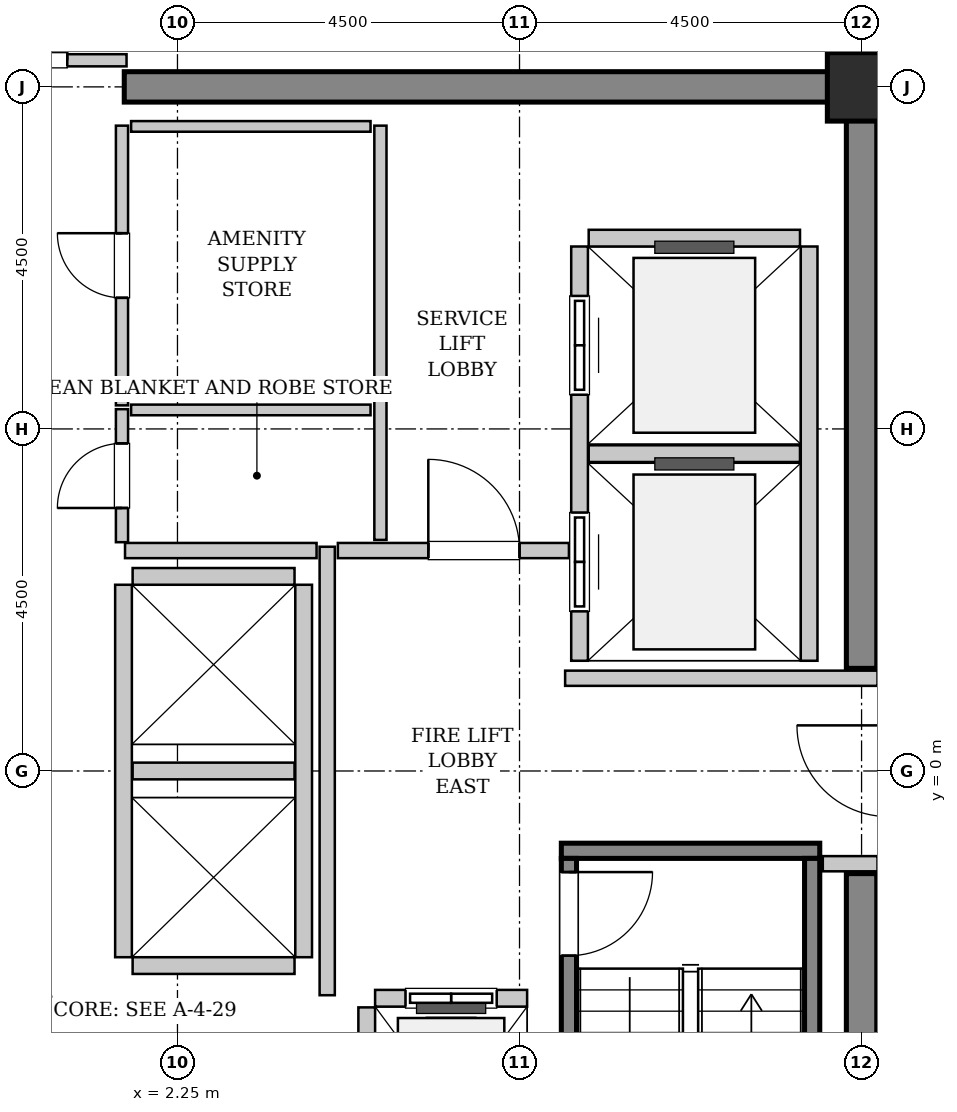
"""IFC4 building model, lengths in metres.
Left out: names, types, materials, properties, quantities, classifications, styles, units other than length and angle.
Written with IfcOpenShell. Run it as: python <this file> out.ifc"""

import sys

from ifc_helpers import new_model, si_unit, direction, frame, frame_2d, origin, origin_2d, place, context, subcontext, project, spatial, rectangle, extrude, source, transform, mapped, element, fill, save


model = new_model("IFC4")
c1 = context("Model", 3, precision=1e-05, world=origin(), true_north=direction((0.0, 1.0)))
c2 = subcontext(c1, "Body", "Model", "MODEL_VIEW")
j1 = project(units=[si_unit("LENGTHUNIT", "METRE"), si_unit("PLANEANGLEUNIT", "RADIAN")], contexts=[c1])
p1 = place(None, origin())
s1 = spatial("IfcSite", under=j1, at=p1, CompositionType="ELEMENT")
p2 = place(p1, origin())
s2 = spatial("IfcBuilding", under=s1, at=p2, CompositionType="ELEMENT")
p3 = place(p2, frame((0.0, 0.0, 333.8)))
s3 = spatial("IfcBuildingStorey", under=s2, at=p3, CompositionType="ELEMENT", Elevation=333.8)
m1 = source(origin(), c2, "Body", "SweptSolid", [
    extrude(rectangle(XDim=9.9, YDim=0.4, at=frame_2d((4.95, 0.0))), origin(), (0.0, 0.0, 1.0), 3.8),
])
p4 = place(p3, frame((1.55, 9.0, 0.0), z_axis=(0.0, 0.0, 1.0), x_axis=(1.0, 0.0, 0.0)))
e1 = element("IfcWall", 1, at=p4, inside=s3, PredefinedType="SHEAR", context=c2, shape_type="MappedRepresentation", body=[
    mapped(m1, transform((0.0, 0.0, 0.0), x_axis=(1.0, 0.0, 0.0), y_axis=(0.0, 1.0, 0.0), z_axis=(0.0, 0.0, 1.0), scale=1.0)),
])
m2 = source(origin(), c2, "Body", "SweptSolid", [
    extrude(rectangle(XDim=7.45, YDim=0.4, at=frame_2d((3.725, 0.0))), origin(), (0.0, 0.0, 1.0), 3.8),
])
for number, where, z_axis, x_axis in (
    (2, (11.25, -8.8, 0.0), (0.0, 0.0, 1.0), (0.0, 1.0, 0.0)),
    (3, (11.25, 1.35, 0.0), (0.0, 0.0, 1.0), (0.0, 1.0, 0.0)),
):
    element("IfcWall", number, at=place(p3, frame(where, z_axis=z_axis, x_axis=x_axis)), inside=s3, PredefinedType="SHEAR", context=c2, shape_type="MappedRepresentation", body=[
        mapped(m2, transform((0.0, 0.0, 0.0), x_axis=(1.0, 0.0, 0.0), y_axis=(0.0, 1.0, 0.0), z_axis=(0.0, 0.0, 1.0), scale=1.0)),
    ])
m3 = source(origin(), c2, "Body", "SweptSolid", [
    extrude(rectangle(XDim=0.9, YDim=0.9, at=origin_2d()), origin(), (0.0, 0.0, 1.0), 3.8),
])
p5 = place(p3, frame((11.25, 9.0, 0.0), z_axis=(0.0, 0.0, 1.0), x_axis=(1.0, 0.0, 0.0)))
e4 = element("IfcColumn", 4, at=p5, inside=s3, PredefinedType="COLUMN", context=c2, shape_type="MappedRepresentation", body=[
    mapped(m3, transform((0.0, 0.0, 0.0), x_axis=(1.0, 0.0, 0.0), y_axis=(0.0, 1.0, 0.0), z_axis=(0.0, 0.0, 1.0), scale=1.0)),
])
m4 = source(origin(), c2, "Body", "SweptSolid", [
    extrude(rectangle(XDim=3.4, YDim=0.2, at=frame_2d((1.7, 0.0))), origin(), (0.0, 0.0, 1.0), 3.8),
])
p6 = place(p3, frame((7.3, -1.05, 0.0), z_axis=(0.0, 0.0, 1.0), x_axis=(1.0, 0.0, 0.0)))
e5 = element("IfcWall", 5, at=p6, inside=s3, PredefinedType="SOLIDWALL", context=c2, shape_type="MappedRepresentation", body=[
    mapped(m4, transform((0.0, 0.0, 0.0), x_axis=(1.0, 0.0, 0.0), y_axis=(0.0, 1.0, 0.0), z_axis=(0.0, 0.0, 1.0), scale=1.0)),
])
m5 = source(origin(), c2, "Body", "SweptSolid", [
    extrude(rectangle(XDim=7.1, YDim=0.2, at=frame_2d((3.55, 0.0))), origin(), (0.0, 0.0, 1.0), 3.8),
])
p7 = place(p3, frame((7.4, -1.15, 0.0), z_axis=(0.0, 0.0, 1.0), x_axis=(0.0, -1.0, 0.0)))
e6 = element("IfcWall", 6, at=p7, inside=s3, PredefinedType="SOLIDWALL", context=c2, shape_type="MappedRepresentation", body=[
    mapped(m5, transform((0.0, 0.0, 0.0), x_axis=(1.0, 0.0, 0.0), y_axis=(0.0, 1.0, 0.0), z_axis=(0.0, 0.0, 1.0), scale=1.0)),
])
p8 = place(p7, frame((0.18, 0.0, 0.0)))
e7 = element("IfcOpeningElement", 7, at=p8, cuts=e6, PredefinedType="OPENING", context=c2, shape_type="SweptSolid", body=[
    extrude(rectangle(XDim=1.1, YDim=2.15, at=frame_2d((0.55, 1.075))), frame((0.0, 0.11, 0.0), z_axis=(0.0, -1.0, 0.0), x_axis=(1.0, 0.0, 0.0)), (0.0, 0.0, 1.0), 0.22),
])
p9 = place(p3, frame((10.6, -1.15, 0.0), z_axis=(0.0, 0.0, 1.0), x_axis=(0.0, -1.0, 0.0)))
e8 = element("IfcWall", 8, at=p9, inside=s3, PredefinedType="SOLIDWALL", context=c2, shape_type="MappedRepresentation", body=[
    mapped(m5, transform((0.0, 0.0, 0.0), x_axis=(1.0, 0.0, 0.0), y_axis=(0.0, 1.0, 0.0), z_axis=(0.0, 0.0, 1.0), scale=1.0)),
])
m6 = source(origin(), c2, "Body", "SweptSolid", [
    extrude(rectangle(XDim=2.0, YDim=0.22, at=frame_2d((1.0, 0.0))), origin(), (0.0, 0.0, 1.0), 3.535),
])
p10 = place(p3, frame((6.85, -2.99, 0.0), z_axis=(0.0, 0.0, 1.0), x_axis=(-1.0, 0.0, 0.0)))
e9 = element("IfcWall", 9, at=p10, inside=s3, PredefinedType="SOLIDWALL", context=c2, shape_type="MappedRepresentation", body=[
    mapped(m6, transform((0.0, 0.0, 0.0), x_axis=(1.0, 0.0, 0.0), y_axis=(0.0, 1.0, 0.0), z_axis=(0.0, 0.0, 1.0), scale=1.0)),
])
p11 = place(p10, frame((0.4, 0.0, 0.0)))
e10 = element("IfcOpeningElement", 10, at=p11, cuts=e9, PredefinedType="OPENING", context=c2, shape_type="SweptSolid", body=[
    extrude(rectangle(XDim=1.2, YDim=2.2, at=frame_2d((0.6, 1.1))), frame((0.0, 0.12, 0.0), z_axis=(0.0, -1.0, 0.0), x_axis=(1.0, 0.0, 0.0)), (0.0, 0.0, 1.0), 0.24),
])
m7 = source(origin(), c2, "Body", "SweptSolid", [
    extrude(rectangle(XDim=2.68, YDim=0.22, at=frame_2d((1.34, 0.0))), origin(), (0.0, 0.0, 1.0), 3.535),
])
p12 = place(p3, frame((4.74, -3.11, 0.0), z_axis=(0.0, 0.0, 1.0), x_axis=(0.0, -1.0, 0.0)))
e11 = element("IfcWall", 11, at=p12, inside=s3, PredefinedType="SOLIDWALL", context=c2, shape_type="MappedRepresentation", body=[
    mapped(m7, transform((0.0, 0.0, 0.0), x_axis=(1.0, 0.0, 0.0), y_axis=(0.0, 1.0, 0.0), z_axis=(0.0, 0.0, 1.0), scale=1.0)),
])
m8 = source(origin(), c2, "Body", "SweptSolid", [
    extrude(rectangle(XDim=5.45, YDim=0.22, at=frame_2d((2.725, 0.0))), origin(), (0.0, 0.0, 1.0), 3.535),
])
p13 = place(p3, frame((7.54, 6.9, 0.0), z_axis=(0.0, 0.0, 1.0), x_axis=(0.0, -1.0, 0.0)))
e12 = element("IfcWall", 12, at=p13, inside=s3, PredefinedType="SOLIDWALL", context=c2, shape_type="MappedRepresentation", body=[
    mapped(m8, transform((0.0, 0.0, 0.0), x_axis=(1.0, 0.0, 0.0), y_axis=(0.0, 1.0, 0.0), z_axis=(0.0, 0.0, 1.0), scale=1.0)),
])
p14 = place(p13, frame((3.5, 0.0, 0.0)))
e13 = element("IfcOpeningElement", 13, at=p14, cuts=e12, PredefinedType="OPENING", context=c2, shape_type="SweptSolid", body=[
    extrude(rectangle(XDim=1.3, YDim=2.3, at=frame_2d((0.65, 1.15))), frame((0.0, 0.12, 0.0), z_axis=(0.0, -1.0, 0.0), x_axis=(1.0, 0.0, 0.0)), (0.0, 0.0, 1.0), 0.24),
])
p15 = place(p13, frame((0.65, 0.0, 0.0)))
e14 = element("IfcOpeningElement", 14, at=p15, cuts=e12, PredefinedType="OPENING", context=c2, shape_type="SweptSolid", body=[
    extrude(rectangle(XDim=1.3, YDim=2.3, at=frame_2d((0.65, 1.15))), frame((0.0, 0.12, 0.0), z_axis=(0.0, -1.0, 0.0), x_axis=(1.0, 0.0, 0.0)), (0.0, 0.0, 1.0), 0.24),
])
p16 = place(p3, frame((10.56, 1.45, 0.0), z_axis=(0.0, 0.0, 1.0), x_axis=(0.0, 1.0, 0.0)))
e15 = element("IfcWall", 15, at=p16, inside=s3, PredefinedType="SOLIDWALL", context=c2, shape_type="MappedRepresentation", body=[
    mapped(m8, transform((0.0, 0.0, 0.0), x_axis=(1.0, 0.0, 0.0), y_axis=(0.0, 1.0, 0.0), z_axis=(0.0, 0.0, 1.0), scale=1.0)),
])
m9 = source(origin(), c2, "Body", "SweptSolid", [
    extrude(rectangle(XDim=2.78, YDim=0.22, at=frame_2d((1.39, 0.0))), origin(), (0.0, 0.0, 1.0), 3.535),
])
for number, where, z_axis, x_axis in (
    (16, (7.66, 4.175, 0.0), (0.0, 0.0, 1.0), (1.0, 0.0, 0.0)),
    (17, (10.44, 7.01, 0.0), (0.0, 0.0, 1.0), (-1.0, 0.0, 0.0)),
):
    element("IfcWall", number, at=place(p3, frame(where, z_axis=z_axis, x_axis=x_axis)), inside=s3, PredefinedType="SOLIDWALL", context=c2, shape_type="MappedRepresentation", body=[
        mapped(m9, transform((0.0, 0.0, 0.0), x_axis=(1.0, 0.0, 0.0), y_axis=(0.0, 1.0, 0.0), z_axis=(0.0, 0.0, 1.0), scale=1.0)),
    ])
m10 = source(origin(), c2, "Body", "SweptSolid", [
    extrude(rectangle(XDim=4.9, YDim=0.22, at=frame_2d((2.45, 0.0))), origin(), (0.0, 0.0, 1.0), 3.535),
])
for number, where, z_axis, x_axis in (
    (18, (1.54, 2.45, 0.0), (0.0, 0.0, 1.0), (0.0, -1.0, 0.0)),
    (19, (3.91, -2.45, 0.0), (0.0, 0.0, 1.0), (0.0, 1.0, 0.0)),
):
    element("IfcWall", number, at=place(p3, frame(where, z_axis=z_axis, x_axis=x_axis)), inside=s3, PredefinedType="SOLIDWALL", context=c2, shape_type="MappedRepresentation", body=[
        mapped(m10, transform((0.0, 0.0, 0.0), x_axis=(1.0, 0.0, 0.0), y_axis=(0.0, 1.0, 0.0), z_axis=(0.0, 0.0, 1.0), scale=1.0)),
    ])
m11 = source(origin(), c2, "Body", "SweptSolid", [
    extrude(rectangle(XDim=2.13, YDim=0.22, at=frame_2d((1.065, 0.0))), origin(), (0.0, 0.0, 1.0), 3.535),
])
for number, where, z_axis, x_axis in (
    (20, (1.66, -2.56, 0.0), (0.0, 0.0, 1.0), (1.0, 0.0, 0.0)),
    (21, (1.66, 0.0, 0.0), (0.0, 0.0, 1.0), (1.0, 0.0, 0.0)),
    (22, (3.79, 2.56, 0.0), (0.0, 0.0, 1.0), (-1.0, 0.0, 0.0)),
):
    element("IfcWall", number, at=place(p3, frame(where, z_axis=z_axis, x_axis=x_axis)), inside=s3, PredefinedType="SOLIDWALL", context=c2, shape_type="MappedRepresentation", body=[
        mapped(m11, transform((0.0, 0.0, 0.0), x_axis=(1.0, 0.0, 0.0), y_axis=(0.0, 1.0, 0.0), z_axis=(0.0, 0.0, 1.0), scale=1.0)),
    ])
m12 = source(origin(), c2, "Body", "SweptSolid", [
    extrude(rectangle(XDim=5.9, YDim=0.2, at=frame_2d((2.95, 0.0))), origin(), (0.0, 0.0, 1.0), 3.535),
])
p17 = place(p3, frame((4.22, -2.95, 0.0), z_axis=(0.0, 0.0, 1.0), x_axis=(0.0, 1.0, 0.0)))
e23 = element("IfcWall", 23, at=p17, inside=s3, PredefinedType="PARTITIONING", context=c2, shape_type="MappedRepresentation", body=[
    mapped(m12, transform((0.0, 0.0, 0.0), x_axis=(1.0, 0.0, 0.0), y_axis=(0.0, 1.0, 0.0), z_axis=(0.0, 0.0, 1.0), scale=1.0)),
])
m13 = source(origin(), c2, "Body", "SweptSolid", [
    extrude(rectangle(XDim=2.52, YDim=0.2, at=frame_2d((1.26, 0.0))), origin(), (0.0, 0.0, 1.0), 3.535),
])
p18 = place(p3, frame((1.56, 2.9, 0.0), z_axis=(0.0, 0.0, 1.0), x_axis=(1.0, 0.0, 0.0)))
e24 = element("IfcWall", 24, at=p18, inside=s3, PredefinedType="PARTITIONING", context=c2, shape_type="MappedRepresentation", body=[
    mapped(m13, transform((0.0, 0.0, 0.0), x_axis=(1.0, 0.0, 0.0), y_axis=(0.0, 1.0, 0.0), z_axis=(0.0, 0.0, 1.0), scale=1.0)),
])
m14 = source(origin(), c2, "Body", "SweptSolid", [
    extrude(rectangle(XDim=3.04, YDim=0.2, at=frame_2d((1.52, 0.0))), origin(), (0.0, 0.0, 1.0), 3.535),
])
p19 = place(p3, frame((4.36, 2.9, 0.0), z_axis=(0.0, 0.0, 1.0), x_axis=(1.0, 0.0, 0.0)))
e25 = element("IfcWall", 25, at=p19, inside=s3, PredefinedType="PARTITIONING", context=c2, shape_type="MappedRepresentation", body=[
    mapped(m14, transform((0.0, 0.0, 0.0), x_axis=(1.0, 0.0, 0.0), y_axis=(0.0, 1.0, 0.0), z_axis=(0.0, 0.0, 1.0), scale=1.0)),
])
p20 = place(p19, frame((1.19, 0.0, 0.0)))
e26 = element("IfcOpeningElement", 26, at=p20, cuts=e25, PredefinedType="OPENING", context=c2, shape_type="SweptSolid", body=[
    extrude(rectangle(XDim=1.2, YDim=2.15, at=frame_2d((0.6, 1.075))), frame((0.0, 0.11, 0.0), z_axis=(0.0, -1.0, 0.0), x_axis=(1.0, 0.0, 0.0)), (0.0, 0.0, 1.0), 0.22),
])
m15 = source(origin(), c2, "Body", "SweptSolid", [
    extrude(rectangle(XDim=4.11, YDim=0.2, at=frame_2d((2.055, 0.0))), origin(), (0.0, 0.0, 1.0), 3.535),
])
p21 = place(p3, frame((7.35, 1.22, 0.0), z_axis=(0.0, 0.0, 1.0), x_axis=(1.0, 0.0, 0.0)))
e27 = element("IfcWall", 27, at=p21, inside=s3, PredefinedType="PARTITIONING", context=c2, shape_type="MappedRepresentation", body=[
    mapped(m15, transform((0.0, 0.0, 0.0), x_axis=(1.0, 0.0, 0.0), y_axis=(0.0, 1.0, 0.0), z_axis=(0.0, 0.0, 1.0), scale=1.0)),
])
m16 = source(origin(), c2, "Body", "SweptSolid", [
    extrude(rectangle(XDim=0.72, YDim=0.2, at=frame_2d((0.36, 0.0))), origin(), (0.0, 0.0, 1.0), 3.535),
])
p22 = place(p3, frame((10.74, -1.22, 0.0), z_axis=(0.0, 0.0, 1.0), x_axis=(1.0, 0.0, 0.0)))
e28 = element("IfcWall", 28, at=p22, inside=s3, PredefinedType="PARTITIONING", context=c2, shape_type="MappedRepresentation", body=[
    mapped(m16, transform((0.0, 0.0, 0.0), x_axis=(1.0, 0.0, 0.0), y_axis=(0.0, 1.0, 0.0), z_axis=(0.0, 0.0, 1.0), scale=1.0)),
])
m17 = source(origin(), c2, "Body", "SweptSolid", [
    extrude(rectangle(XDim=3.16, YDim=0.16, at=frame_2d((1.58, 0.0))), origin(), (0.0, 0.0, 1.0), 2.625),
])
p23 = place(p3, frame((-1.58, 9.35, 0.0), z_axis=(0.0, 0.0, 1.0), x_axis=(1.0, 0.0, 0.0)))
e29 = element("IfcWall", 29, at=p23, inside=s3, PredefinedType="PARTITIONING", context=c2, shape_type="MappedRepresentation", body=[
    mapped(m17, transform((0.0, 0.0, 0.0), x_axis=(1.0, 0.0, 0.0), y_axis=(0.0, 1.0, 0.0), z_axis=(0.0, 0.0, 1.0), scale=1.0)),
])
p24 = place(p23, frame((0.78, 0.0, 0.0)))
e30 = element("IfcOpeningElement", 30, at=p24, cuts=e29, PredefinedType="OPENING", context=c2, shape_type="SweptSolid", body=[
    extrude(rectangle(XDim=1.6, YDim=2.3, at=frame_2d((0.8, 1.15))), frame((0.0, 0.09, 0.0), z_axis=(0.0, -1.0, 0.0), x_axis=(1.0, 0.0, 0.0)), (0.0, 0.0, 1.0), 0.18),
])
m18 = source(origin(), c2, "Body", "SweptSolid", [
    extrude(rectangle(XDim=5.45, YDim=0.16, at=frame_2d((2.725, 0.0))), origin(), (0.0, 0.0, 1.0), 3.535),
])
p25 = place(p3, frame((4.92, 3.04, 0.0), z_axis=(0.0, 0.0, 1.0), x_axis=(0.0, 1.0, 0.0)))
e31 = element("IfcWall", 31, at=p25, inside=s3, PredefinedType="PARTITIONING", context=c2, shape_type="MappedRepresentation", body=[
    mapped(m18, transform((0.0, 0.0, 0.0), x_axis=(1.0, 0.0, 0.0), y_axis=(0.0, 1.0, 0.0), z_axis=(0.0, 0.0, 1.0), scale=1.0)),
])
m19 = source(origin(), c2, "Body", "SweptSolid", [
    extrude(rectangle(XDim=1.75, YDim=0.16, at=frame_2d((0.875, 0.0))), origin(), (0.0, 0.0, 1.0), 3.535),
])
p26 = place(p3, frame((1.52, 3.01, 0.0), z_axis=(0.0, 0.0, 1.0), x_axis=(0.0, 1.0, 0.0)))
e32 = element("IfcWall", 32, at=p26, inside=s3, PredefinedType="PARTITIONING", context=c2, shape_type="MappedRepresentation", body=[
    mapped(m19, transform((0.0, 0.0, 0.0), x_axis=(1.0, 0.0, 0.0), y_axis=(0.0, 1.0, 0.0), z_axis=(0.0, 0.0, 1.0), scale=1.0)),
])
p27 = place(p26, frame((0.45, 0.0, 0.0)))
e33 = element("IfcOpeningElement", 33, at=p27, cuts=e32, PredefinedType="OPENING", context=c2, shape_type="SweptSolid", body=[
    extrude(rectangle(XDim=0.85, YDim=2.1, at=frame_2d((0.425, 1.05))), frame((0.0, 0.09, 0.0), z_axis=(0.0, -1.0, 0.0), x_axis=(1.0, 0.0, 0.0)), (0.0, 0.0, 1.0), 0.18),
])
m20 = source(origin(), c2, "Body", "SweptSolid", [
    extrude(rectangle(XDim=3.15, YDim=0.14, at=frame_2d((1.575, 0.0))), origin(), (0.0, 0.0, 1.0), 3.535),
])
p28 = place(p3, frame((1.64, 4.75, 0.0), z_axis=(0.0, 0.0, 1.0), x_axis=(1.0, 0.0, 0.0)))
e34 = element("IfcWall", 34, at=p28, inside=s3, PredefinedType="PARTITIONING", context=c2, shape_type="MappedRepresentation", body=[
    mapped(m20, transform((0.0, 0.0, 0.0), x_axis=(1.0, 0.0, 0.0), y_axis=(0.0, 1.0, 0.0), z_axis=(0.0, 0.0, 1.0), scale=1.0)),
])
m21 = source(origin(), c2, "Body", "SweptSolid", [
    extrude(rectangle(XDim=3.68, YDim=0.16, at=frame_2d((1.84, 0.0))), origin(), (0.0, 0.0, 1.0), 3.535),
])
p29 = place(p3, frame((1.52, 4.81, 0.0), z_axis=(0.0, 0.0, 1.0), x_axis=(0.0, 1.0, 0.0)))
e35 = element("IfcWall", 35, at=p29, inside=s3, PredefinedType="PARTITIONING", context=c2, shape_type="MappedRepresentation", body=[
    mapped(m21, transform((0.0, 0.0, 0.0), x_axis=(1.0, 0.0, 0.0), y_axis=(0.0, 1.0, 0.0), z_axis=(0.0, 0.0, 1.0), scale=1.0)),
])
p30 = place(p29, frame((1.415, 0.0, 0.0)))
e36 = element("IfcOpeningElement", 36, at=p30, cuts=e35, PredefinedType="OPENING", context=c2, shape_type="SweptSolid", body=[
    extrude(rectangle(XDim=0.85, YDim=2.1, at=frame_2d((0.425, 1.05))), frame((0.0, 0.09, 0.0), z_axis=(0.0, -1.0, 0.0), x_axis=(1.0, 0.0, 0.0)), (0.0, 0.0, 1.0), 0.18),
])
p31 = place(p3, frame((1.64, 8.48, 0.0), z_axis=(0.0, 0.0, 1.0), x_axis=(1.0, 0.0, 0.0)))
e37 = element("IfcWall", 37, at=p31, inside=s3, PredefinedType="PARTITIONING", context=c2, shape_type="MappedRepresentation", body=[
    mapped(m20, transform((0.0, 0.0, 0.0), x_axis=(1.0, 0.0, 0.0), y_axis=(0.0, 1.0, 0.0), z_axis=(0.0, 0.0, 1.0), scale=1.0)),
])
m22 = source(origin(), c2, "Body", "SweptSolid", [
    extrude(rectangle(XDim=1.1, YDim=2.15, at=frame_2d((0.55, 1.075))), frame((0.0, 0.025, 0.0), z_axis=(0.0, -1.0, 0.0), x_axis=(1.0, 0.0, 0.0)), (0.0, 0.0, 1.0), 0.05),
])
p32 = place(p8, origin())
e38 = element("IfcDoor", 38, at=p32, inside=s3, OperationType="SINGLE_SWING_LEFT", PredefinedType="DOOR", context=c2, shape_type="MappedRepresentation", body=[
    mapped(m22, transform((0.0, 0.0, 0.0), x_axis=(1.0, 0.0, 0.0), y_axis=(0.0, 1.0, 0.0), z_axis=(0.0, 0.0, 1.0), scale=1.0)),
])
fill(e7, e38)
m23 = source(origin(), c2, "Body", "SweptSolid", [
    extrude(rectangle(XDim=1.2, YDim=2.2, at=frame_2d((0.6, 1.1))), frame((0.0, 0.025, 0.0), z_axis=(0.0, -1.0, 0.0), x_axis=(1.0, 0.0, 0.0)), (0.0, 0.0, 1.0), 0.05),
])
p33 = place(p11, origin())
e39 = element("IfcDoor", 39, at=p33, inside=s3, OperationType="SLIDING_TO_LEFT", PredefinedType="DOOR", context=c2, shape_type="MappedRepresentation", body=[
    mapped(m23, transform((0.0, 0.0, 0.0), x_axis=(1.0, 0.0, 0.0), y_axis=(0.0, 1.0, 0.0), z_axis=(0.0, 0.0, 1.0), scale=1.0)),
])
fill(e10, e39)
m24 = source(origin(), c2, "Body", "SweptSolid", [
    extrude(rectangle(XDim=1.3, YDim=2.3, at=frame_2d((0.65, 1.15))), frame((0.0, 0.025, 0.0), z_axis=(0.0, -1.0, 0.0), x_axis=(1.0, 0.0, 0.0)), (0.0, 0.0, 1.0), 0.05),
])
p34 = place(p14, origin())
e40 = element("IfcDoor", 40, at=p34, inside=s3, OperationType="SLIDING_TO_RIGHT", PredefinedType="DOOR", context=c2, shape_type="MappedRepresentation", body=[
    mapped(m24, transform((0.0, 0.0, 0.0), x_axis=(1.0, 0.0, 0.0), y_axis=(0.0, 1.0, 0.0), z_axis=(0.0, 0.0, 1.0), scale=1.0)),
])
fill(e13, e40)
p35 = place(p15, origin())
e41 = element("IfcDoor", 41, at=p35, inside=s3, OperationType="SLIDING_TO_RIGHT", PredefinedType="DOOR", context=c2, shape_type="MappedRepresentation", body=[
    mapped(m24, transform((0.0, 0.0, 0.0), x_axis=(1.0, 0.0, 0.0), y_axis=(0.0, 1.0, 0.0), z_axis=(0.0, 0.0, 1.0), scale=1.0)),
])
fill(e14, e41)
m25 = source(origin(), c2, "Body", "SweptSolid", [
    extrude(rectangle(XDim=1.2, YDim=2.15, at=frame_2d((0.6, 1.075))), frame((0.0, 0.025, 0.0), z_axis=(0.0, -1.0, 0.0), x_axis=(1.0, 0.0, 0.0)), (0.0, 0.0, 1.0), 0.05),
])
p36 = place(p20, origin())
e42 = element("IfcDoor", 42, at=p36, inside=s3, OperationType="SINGLE_SWING_LEFT", PredefinedType="DOOR", context=c2, shape_type="MappedRepresentation", body=[
    mapped(m25, transform((0.0, 0.0, 0.0), x_axis=(1.0, 0.0, 0.0), y_axis=(0.0, 1.0, 0.0), z_axis=(0.0, 0.0, 1.0), scale=1.0)),
])
fill(e26, e42)
m26 = source(origin(), c2, "Body", "SweptSolid", [
    extrude(rectangle(XDim=1.6, YDim=2.3, at=frame_2d((0.8, 1.15))), frame((0.0, 0.025, 0.0), z_axis=(0.0, -1.0, 0.0), x_axis=(1.0, 0.0, 0.0)), (0.0, 0.0, 1.0), 0.05),
])
p37 = place(p24, origin())
e43 = element("IfcDoor", 43, at=p37, inside=s3, OperationType="DOUBLE_DOOR_SINGLE_SWING", PredefinedType="DOOR", context=c2, shape_type="MappedRepresentation", body=[
    mapped(m26, transform((0.0, 0.0, 0.0), x_axis=(1.0, 0.0, 0.0), y_axis=(0.0, 1.0, 0.0), z_axis=(0.0, 0.0, 1.0), scale=1.0)),
])
fill(e30, e43)
m27 = source(origin(), c2, "Body", "SweptSolid", [
    extrude(rectangle(XDim=0.85, YDim=2.1, at=frame_2d((0.425, 1.05))), frame((0.0, 0.025, 0.0), z_axis=(0.0, -1.0, 0.0), x_axis=(1.0, 0.0, 0.0)), (0.0, 0.0, 1.0), 0.05),
])
p38 = place(p27, origin())
e44 = element("IfcDoor", 44, at=p38, inside=s3, OperationType="SINGLE_SWING_LEFT", PredefinedType="DOOR", context=c2, shape_type="MappedRepresentation", body=[
    mapped(m27, transform((0.0, 0.0, 0.0), x_axis=(1.0, 0.0, 0.0), y_axis=(0.0, 1.0, 0.0), z_axis=(0.0, 0.0, 1.0), scale=1.0)),
])
fill(e33, e44)
p39 = place(p30, origin())
e45 = element("IfcDoor", 45, at=p39, inside=s3, OperationType="SINGLE_SWING_RIGHT", PredefinedType="DOOR", context=c2, shape_type="MappedRepresentation", body=[
    mapped(m27, transform((0.0, 0.0, 0.0), x_axis=(1.0, 0.0, 0.0), y_axis=(0.0, 1.0, 0.0), z_axis=(0.0, 0.0, 1.0), scale=1.0)),
])
fill(e36, e45)
save(model, sys.argv[1])
